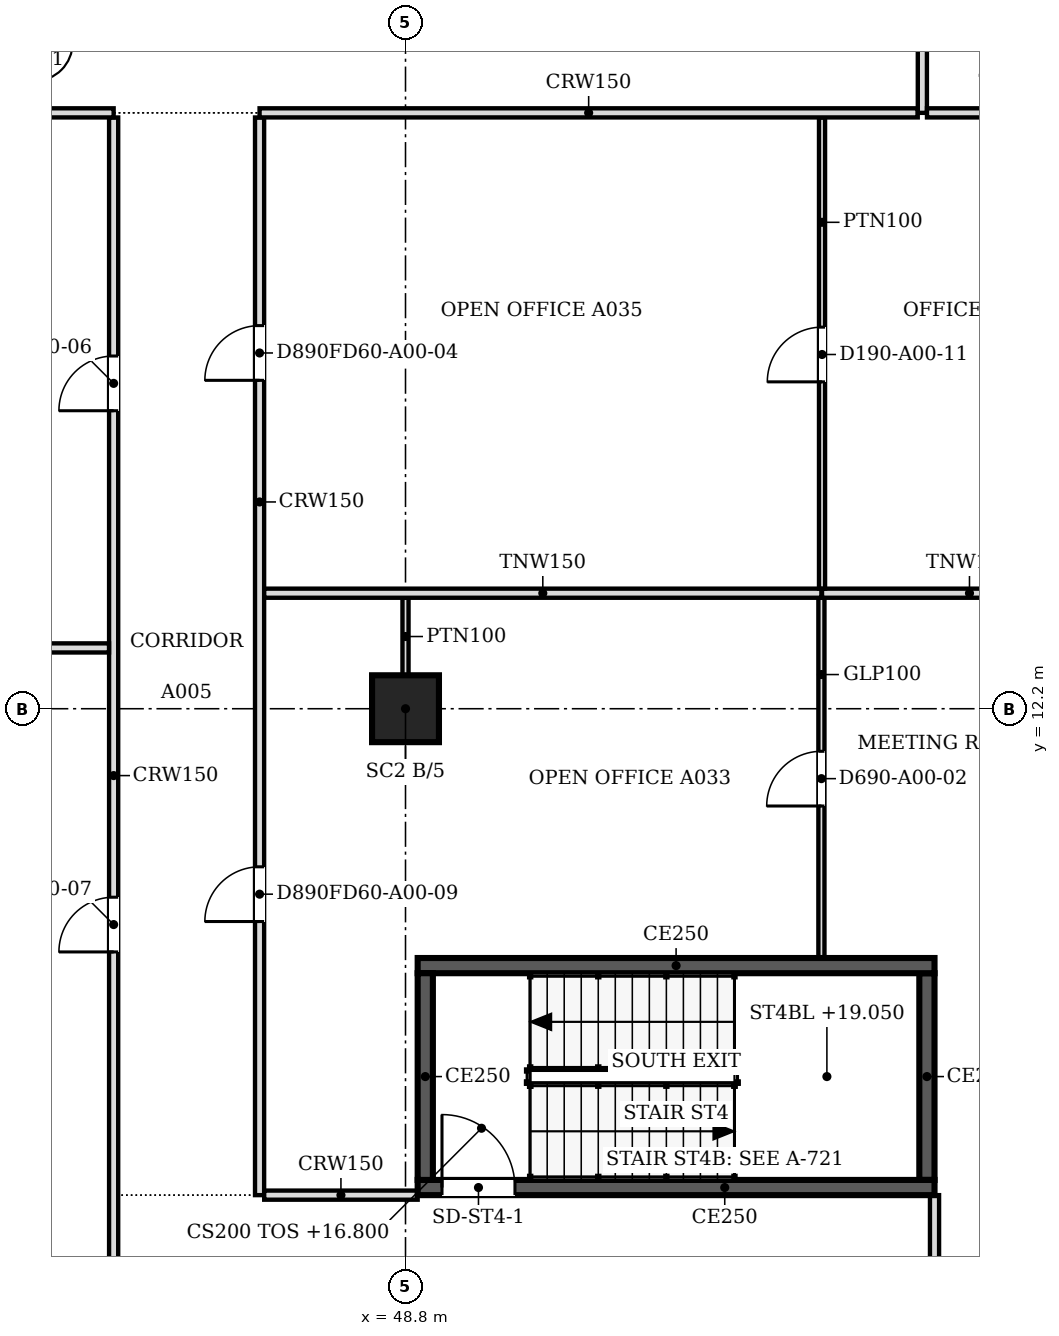
"""IFC4 building model, lengths in metres.
Left out: names, types, materials, properties, quantities, classifications, styles, units other than length and angle.
Written with IfcOpenShell. Run it as: python <this file> out.ifc"""

import sys

from ifc_helpers import new_model, si_unit, direction, frame, frame_2d, origin, origin_2d, place, context, subcontext, project, spatial, polyline, rectangle, outline, extrude, faceted_brep, source, transform, mapped, element, fill, save


model = new_model("IFC4")
c1 = context("Model", 3, precision=1e-05, world=origin(), true_north=direction((0.0, 1.0)))
c2 = subcontext(c1, "Body", "Model", "MODEL_VIEW")
j1 = project(units=[si_unit("LENGTHUNIT", "METRE"), si_unit("PLANEANGLEUNIT", "RADIAN")], contexts=[c1])
p1 = place(None, origin())
s1 = spatial("IfcSite", under=j1, at=p1, CompositionType="ELEMENT")
p2 = place(p1, origin())
s2 = spatial("IfcBuilding", under=s1, at=p2, CompositionType="ELEMENT")
p3 = place(p2, frame((0.0, 0.0, 16.8)))
s3 = spatial("IfcBuildingStorey", under=s2, at=p3, CompositionType="ELEMENT", Elevation=16.8)
p4 = place(p3, frame((48.8, 12.2, 0.0), z_axis=(0.0, 0.0, 1.0), x_axis=(1.0, 0.0, 0.0)))
e1 = element("IfcColumn", 1, at=p4, inside=s3, PredefinedType="COLUMN", context=c2, shape_type="SweptSolid", body=[
    extrude(rectangle(XDim=1.1, YDim=1.1, at=origin_2d()), origin(), (0.0, 0.0, 1.0), 4.3),
])
m1 = source(origin(), c2, "Body", "Brep", [
    faceted_brep([(2.997, -0.25, 4.419), (2.944, -0.25, 4.5), (0.0, -0.25, 0.0), (2.997, -0.25, 0.0), (0.053, 0.25, 0.081), (2.891, 0.25, 4.419), (2.891, 0.25, 0.0), (0.053, 0.25, 0.0), (2.944, 0.0, 4.5), (0.0, 0.0, 0.0)], [[[0, 1, 2, 3]], [[4, 5, 6, 7]], [[8, 1, 0]], [[5, 4, 9, 2, 1, 8]], [[7, 6, 3, 2, 9]], [[7, 9, 4]], [[3, 6, 5, 8, 0]]]),
])
p5 = place(p3, frame((57.606, 1.312, 0.0), z_axis=(0.0, 0.0, 1.0), x_axis=(0.707147509625, 0.707066050402, 0.0)))
e2 = element("IfcWall", 2, at=p5, inside=s3, PredefinedType="SOLIDWALL", context=c2, shape_type="MappedRepresentation", body=[
    mapped(m1, transform((0.0, 0.0, 0.0), scale=1.0)),
])
m2 = source(origin(), c2, "Body", "SweptSolid", [
    extrude(outline(polyline([(2.744, 3.738), (0.462, 0.25), (2.744, 0.25), (2.744, 3.738)])), frame((0.0, 0.26, 0.0), z_axis=(0.0, -1.0, 0.0), x_axis=(1.0, 0.0, 0.0)), (0.0, 0.0, 1.0), 0.52),
])
p6 = place(p5, origin())
e3 = element("IfcOpeningElement", 3, at=p6, cuts=e2, PredefinedType="OPENING", context=c2, shape_type="MappedRepresentation", body=[
    mapped(m2, transform((0.0, 0.0, 0.0), scale=1.0)),
])
p7 = place(p2, frame((0.0, 0.0, 21.3)))
s4 = spatial("IfcBuildingStorey", under=s2, at=p7, CompositionType="ELEMENT", Elevation=21.3)
m3 = source(origin(), c2, "Body", "Brep", [
    faceted_brep([(0.053, -0.25, 0.0), (2.997, -0.25, 4.5), (0.053, -0.25, 9.0), (0.0, -0.25, 8.919), (0.0, -0.25, 0.081), (0.106, 0.25, 8.919), (2.944, 0.25, 4.581), (2.944, 0.25, 4.419), (0.106, 0.25, 0.081), (2.997, 0.0, 4.5), (0.053, 0.0, 0.0), (0.053, 0.0, 9.0)], [[[0, 1, 2, 3, 4]], [[5, 6, 7, 8]], [[8, 7, 9, 1, 0, 10]], [[6, 5, 11, 2, 1, 9]], [[3, 2, 11]], [[10, 0, 4]], [[8, 10, 4, 3, 11, 5]], [[9, 7, 6]]]),
])
p8 = place(p7, frame((57.569, 1.274, -4.5), z_axis=(0.0, 0.0, 1.0), x_axis=(0.707066050402, 0.707147509625, 0.0)))
e4 = element("IfcWall", 4, at=p8, inside=s4, PredefinedType="SOLIDWALL", context=c2, shape_type="MappedRepresentation", body=[
    mapped(m3, transform((0.0, 0.0, 0.0), scale=1.0)),
])
m4 = source(origin(), c2, "Body", "SweptSolid", [
    extrude(outline(polyline([(0.253, 0.762), (2.698, 4.5), (0.253, 8.238), (0.253, 0.762)])), frame((0.0, 0.26, 0.0), z_axis=(0.0, -1.0, 0.0), x_axis=(1.0, 0.0, 0.0)), (0.0, 0.0, 1.0), 0.52),
])
p9 = place(p8, origin())
e5 = element("IfcOpeningElement", 5, at=p9, cuts=e4, PredefinedType="OPENING", context=c2, shape_type="MappedRepresentation", body=[
    mapped(m4, transform((0.0, 0.0, 0.0), scale=1.0)),
])
p10 = place(p3, frame((57.5, 4.325, 0.0), z_axis=(0.0, 0.0, 1.0), x_axis=(-1.0, 0.0, 0.0)))
e6 = element("IfcWall", 6, at=p10, inside=s3, PredefinedType="SOLIDWALL", context=c2, shape_type="SweptSolid", body=[
    extrude(rectangle(XDim=8.5, YDim=0.25, at=frame_2d((4.25, 0.0))), origin(), (0.0, 0.0, 1.0), 4.5),
])
m5 = source(origin(), c2, "Body", "SweptSolid", [
    extrude(rectangle(XDim=1.2, YDim=2.1, at=frame_2d((0.6, 1.05))), frame((0.0, 0.135, 0.0), z_axis=(0.0, -1.0, 0.0), x_axis=(1.0, 0.0, 0.0)), (0.0, 0.0, 1.0), 0.27),
])
p11 = place(p10, frame((6.9, 0.0, 0.0)))
e7 = element("IfcOpeningElement", 7, at=p11, cuts=e6, PredefinedType="OPENING", context=c2, shape_type="MappedRepresentation", body=[
    mapped(m5, transform((0.0, 0.0, 0.0), scale=1.0)),
])
p12 = place(p3, frame((49.125, 4.45, 0.0), z_axis=(0.0, 0.0, 1.0), x_axis=(0.0, 1.0, 0.0)))
e8 = element("IfcWall", 8, at=p12, inside=s3, PredefinedType="SOLIDWALL", context=c2, shape_type="SweptSolid", body=[
    extrude(rectangle(XDim=3.4, YDim=0.25, at=frame_2d((1.7, 0.0))), origin(), (0.0, 0.0, 1.0), 4.5),
])
p13 = place(p3, frame((49.0, 7.975, 0.0), z_axis=(0.0, 0.0, 1.0), x_axis=(1.0, 0.0, 0.0)))
e9 = element("IfcWall", 9, at=p13, inside=s3, PredefinedType="SOLIDWALL", context=c2, shape_type="SweptSolid", body=[
    extrude(rectangle(XDim=8.5, YDim=0.25, at=frame_2d((4.25, 0.0))), origin(), (0.0, 0.0, 1.0), 4.5),
])
p14 = place(p3, frame((57.375, 7.85, 0.0), z_axis=(0.0, 0.0, 1.0), x_axis=(0.0, -1.0, 0.0)))
e10 = element("IfcWall", 10, at=p14, inside=s3, PredefinedType="SOLIDWALL", context=c2, shape_type="SweptSolid", body=[
    extrude(rectangle(XDim=3.4, YDim=0.25, at=frame_2d((1.7, 0.0))), origin(), (0.0, 0.0, 1.0), 4.5),
])
p15 = place(p3, frame((44.0, 0.5, 0.0), z_axis=(0.0, 0.0, 1.0), x_axis=(0.0, 1.0, 0.0)))
e11 = element("IfcWall", 11, at=p15, inside=s3, PredefinedType="PARTITIONING", context=c2, shape_type="SweptSolid", body=[
    extrude(rectangle(XDim=21.424, YDim=0.15, at=frame_2d((10.712, 0.0))), origin(), (0.0, 0.0, 1.0), 3.415),
])
m6 = source(origin(), c2, "Body", "SweptSolid", [
    extrude(rectangle(XDim=0.9, YDim=2.1, at=frame_2d((0.45, 1.05))), frame((0.0, 0.085, 0.0), z_axis=(0.0, -1.0, 0.0), x_axis=(1.0, 0.0, 0.0)), (0.0, 0.0, 1.0), 0.17),
])
p16 = place(p15, frame((16.601, 0.0, 0.0)))
e12 = element("IfcOpeningElement", 12, at=p16, cuts=e11, PredefinedType="OPENING", context=c2, shape_type="MappedRepresentation", body=[
    mapped(m6, transform((0.0, 0.0, 0.0), scale=1.0)),
])
p17 = place(p15, frame((7.7, 0.0, 0.0)))
e13 = element("IfcOpeningElement", 13, at=p17, cuts=e11, PredefinedType="OPENING", context=c2, shape_type="MappedRepresentation", body=[
    mapped(m6, transform((0.0, 0.0, 0.0), scale=1.0)),
])
p18 = place(p3, frame((57.5, 1.559, 0.0), z_axis=(0.0, 0.0, 1.0), x_axis=(0.0, 1.0, 0.0)))
e14 = element("IfcWall", 14, at=p18, inside=s3, PredefinedType="PARTITIONING", context=c2, shape_type="SweptSolid", body=[
    extrude(rectangle(XDim=2.641, YDim=0.15, at=frame_2d((1.32, 0.0))), origin(), (0.0, 0.0, 1.0), 3.415),
])
p19 = place(p3, frame((46.4, 21.924, 0.0), z_axis=(0.0, 0.0, 1.0), x_axis=(0.0, -1.0, 0.0)))
e15 = element("IfcWall", 15, at=p19, inside=s3, PredefinedType="PARTITIONING", context=c2, shape_type="SweptSolid", body=[
    extrude(rectangle(XDim=17.724, YDim=0.15, at=frame_2d((8.862, 0.0))), origin(), (0.0, 0.0, 1.0), 3.415),
])
p20 = place(p19, frame((3.423, 0.0, 0.0)))
e16 = element("IfcOpeningElement", 16, at=p20, cuts=e15, PredefinedType="OPENING", context=c2, shape_type="MappedRepresentation", body=[
    mapped(m6, transform((0.0, 0.0, 0.0), scale=1.0)),
])
p21 = place(p19, frame((12.324, 0.0, 0.0)))
e17 = element("IfcOpeningElement", 17, at=p21, cuts=e15, PredefinedType="OPENING", context=c2, shape_type="MappedRepresentation", body=[
    mapped(m6, transform((0.0, 0.0, 0.0), scale=1.0)),
])
p22 = place(p3, frame((46.476, 4.2, 0.0), z_axis=(0.0, 0.0, 1.0), x_axis=(1.0, 0.0, 0.0)))
e18 = element("IfcWall", 18, at=p22, inside=s3, PredefinedType="PARTITIONING", context=c2, shape_type="SweptSolid", body=[
    extrude(rectangle(XDim=2.524, YDim=0.15, at=frame_2d((1.262, 0.0))), origin(), (0.0, 0.0, 1.0), 3.415),
])
p23 = place(p3, frame((55.64, 14.024, 0.0), z_axis=(0.0, 0.0, 1.0), x_axis=(0.0, -1.0, 0.0)))
e19 = element("IfcWall", 19, at=p23, inside=s3, PredefinedType="PARTITIONING", context=c2, shape_type="SweptSolid", body=[
    extrude(rectangle(XDim=5.924, YDim=0.1, at=frame_2d((2.962, 0.0))), origin(), (0.0, 0.0, 1.0), 3.415),
])
m7 = source(origin(), c2, "Body", "SweptSolid", [
    extrude(rectangle(XDim=0.9, YDim=2.1, at=frame_2d((0.45, 1.05))), frame((0.0, 0.06, 0.0), z_axis=(0.0, -1.0, 0.0), x_axis=(1.0, 0.0, 0.0)), (0.0, 0.0, 1.0), 0.12),
])
p24 = place(p23, frame((2.524, 0.0, 0.0)))
e20 = element("IfcOpeningElement", 20, at=p24, cuts=e19, PredefinedType="OPENING", context=c2, shape_type="MappedRepresentation", body=[
    mapped(m7, transform((0.0, 0.0, 0.0), scale=1.0)),
])
p25 = place(p3, frame((48.8, 12.75, 0.0), z_axis=(0.0, 0.0, 1.0), x_axis=(0.0, 1.0, 0.0)))
e21 = element("IfcWall", 21, at=p25, inside=s3, PredefinedType="PARTITIONING", context=c2, shape_type="SweptSolid", body=[
    extrude(rectangle(XDim=1.275, YDim=0.1, at=frame_2d((0.637, 0.0))), origin(), (0.0, 0.0, 1.0), 3.415),
])
p26 = place(p3, frame((24.55, 13.2, 0.0), z_axis=(0.0, 0.0, 1.0), x_axis=(1.0, 0.0, 0.0)))
e22 = element("IfcWall", 22, at=p26, inside=s3, PredefinedType="PARTITIONING", context=c2, shape_type="SweptSolid", body=[
    extrude(rectangle(XDim=19.374, YDim=0.15, at=frame_2d((9.687, 0.0))), origin(), (0.0, 0.0, 1.0), 3.415),
])
p27 = place(p3, frame((46.476, 14.1, 0.0), z_axis=(0.0, 0.0, 1.0), x_axis=(1.0, 0.0, 0.0)))
e23 = element("IfcWall", 23, at=p27, inside=s3, PredefinedType="PARTITIONING", context=c2, shape_type="SweptSolid", body=[
    extrude(rectangle(XDim=9.164, YDim=0.15, at=frame_2d((4.582, 0.0))), origin(), (0.0, 0.0, 1.0), 3.415),
])
p28 = place(p3, frame((55.65, 14.1, 0.0), z_axis=(0.0, 0.0, 1.0), x_axis=(1.0, 0.0, 0.0)))
e24 = element("IfcWall", 24, at=p28, inside=s3, PredefinedType="PARTITIONING", context=c2, shape_type="SweptSolid", body=[
    extrude(rectangle(XDim=4.85, YDim=0.15, at=frame_2d((2.425, 0.0))), origin(), (0.0, 0.0, 1.0), 3.415),
])
p29 = place(p3, frame((55.65, 21.924, 0.0), z_axis=(0.0, 0.0, 1.0), x_axis=(0.0, -1.0, 0.0)))
e25 = element("IfcWall", 25, at=p29, inside=s3, PredefinedType="PARTITIONING", context=c2, shape_type="SweptSolid", body=[
    extrude(rectangle(XDim=7.748, YDim=0.1, at=frame_2d((3.874, 0.0))), origin(), (0.0, 0.0, 1.0), 3.415),
])
p30 = place(p29, frame((3.448, 0.0, 0.0)))
e26 = element("IfcOpeningElement", 26, at=p30, cuts=e25, PredefinedType="OPENING", context=c2, shape_type="MappedRepresentation", body=[
    mapped(m7, transform((0.0, 0.0, 0.0), scale=1.0)),
])
p31 = place(p3, frame((30.5, 22.0, 0.0), z_axis=(0.0, 0.0, 1.0), x_axis=(1.0, 0.0, 0.0)))
e27 = element("IfcWall", 27, at=p31, inside=s3, PredefinedType="PARTITIONING", context=c2, shape_type="SweptSolid", body=[
    extrude(rectangle(XDim=13.5, YDim=0.15, at=frame_2d((6.75, 0.0))), origin(), (0.0, 0.0, 1.0), 3.415),
])
p32 = place(p3, frame((46.4, 22.0, 0.0), z_axis=(0.0, 0.0, 1.0), x_axis=(1.0, 0.0, 0.0)))
e28 = element("IfcWall", 28, at=p32, inside=s3, PredefinedType="PARTITIONING", context=c2, shape_type="SweptSolid", body=[
    extrude(rectangle(XDim=10.824, YDim=0.15, at=frame_2d((5.412, 0.0))), origin(), (0.0, 0.0, 1.0), 3.415),
])
p33 = place(p3, frame((57.3, 30.6, 0.0), z_axis=(0.0, 0.0, 1.0), x_axis=(0.0, -1.0, 0.0)))
e29 = element("IfcWall", 29, at=p33, inside=s3, PredefinedType="PARTITIONING", context=c2, shape_type="SweptSolid", body=[
    extrude(rectangle(XDim=8.6, YDim=0.15, at=frame_2d((4.3, 0.0))), origin(), (0.0, 0.0, 1.0), 3.415),
])
p34 = place(p33, frame((3.9, 0.0, 0.0)))
e30 = element("IfcOpeningElement", 30, at=p34, cuts=e29, PredefinedType="OPENING", context=c2, shape_type="MappedRepresentation", body=[
    mapped(m6, transform((0.0, 0.0, 0.0), scale=1.0)),
])
p35 = place(p3, frame((57.376, 22.0, 0.0), z_axis=(0.0, 0.0, 1.0), x_axis=(1.0, 0.0, 0.0)))
e31 = element("IfcWall", 31, at=p35, inside=s3, PredefinedType="PARTITIONING", context=c2, shape_type="SweptSolid", body=[
    extrude(rectangle(XDim=3.124, YDim=0.15, at=frame_2d((1.562, 0.0))), origin(), (0.0, 0.0, 1.0), 3.415),
])
m8 = source(origin(), c2, "Body", "SweptSolid", [
    extrude(rectangle(XDim=1.2, YDim=2.1, at=frame_2d((0.6, 1.05))), frame((0.0, 0.025, 0.0), z_axis=(0.0, -1.0, 0.0), x_axis=(1.0, 0.0, 0.0)), (0.0, 0.0, 1.0), 0.05),
])
p36 = place(p11, origin())
e32 = element("IfcDoor", 32, at=p36, inside=s3, OperationType="SINGLE_SWING_RIGHT", PredefinedType="DOOR", context=c2, shape_type="MappedRepresentation", body=[
    mapped(m8, transform((0.0, 0.0, 0.0), scale=1.0)),
])
fill(e7, e32)
m9 = source(origin(), c2, "Body", "SweptSolid", [
    extrude(rectangle(XDim=0.9, YDim=2.1, at=frame_2d((0.45, 1.05))), frame((0.0, 0.025, 0.0), z_axis=(0.0, -1.0, 0.0), x_axis=(1.0, 0.0, 0.0)), (0.0, 0.0, 1.0), 0.05),
])
p37 = place(p24, origin())
e33 = element("IfcDoor", 33, at=p37, inside=s3, OperationType="SINGLE_SWING_RIGHT", PredefinedType="DOOR", context=c2, shape_type="MappedRepresentation", body=[
    mapped(m9, transform((0.0, 0.0, 0.0), scale=1.0)),
])
fill(e20, e33)
p38 = place(p30, origin())
e34 = element("IfcDoor", 34, at=p38, inside=s3, OperationType="SINGLE_SWING_RIGHT", PredefinedType="DOOR", context=c2, shape_type="MappedRepresentation", body=[
    mapped(m9, transform((0.0, 0.0, 0.0), scale=1.0)),
])
fill(e26, e34)
p39 = place(p20, origin())
e35 = element("IfcDoor", 35, at=p39, inside=s3, OperationType="SINGLE_SWING_RIGHT", PredefinedType="DOOR", context=c2, shape_type="MappedRepresentation", body=[
    mapped(m9, transform((0.0, 0.0, 0.0), scale=1.0)),
])
fill(e16, e35)
p40 = place(p16, origin())
e36 = element("IfcDoor", 36, at=p40, inside=s3, OperationType="SINGLE_SWING_LEFT", PredefinedType="DOOR", context=c2, shape_type="MappedRepresentation", body=[
    mapped(m9, transform((0.0, 0.0, 0.0), scale=1.0)),
])
fill(e12, e36)
p41 = place(p17, origin())
e37 = element("IfcDoor", 37, at=p41, inside=s3, OperationType="SINGLE_SWING_LEFT", PredefinedType="DOOR", context=c2, shape_type="MappedRepresentation", body=[
    mapped(m9, transform((0.0, 0.0, 0.0), scale=1.0)),
])
fill(e13, e37)
p42 = place(p21, origin())
e38 = element("IfcDoor", 38, at=p42, inside=s3, OperationType="SINGLE_SWING_RIGHT", PredefinedType="DOOR", context=c2, shape_type="MappedRepresentation", body=[
    mapped(m9, transform((0.0, 0.0, 0.0), scale=1.0)),
])
fill(e17, e38)
save(model, sys.argv[1])
